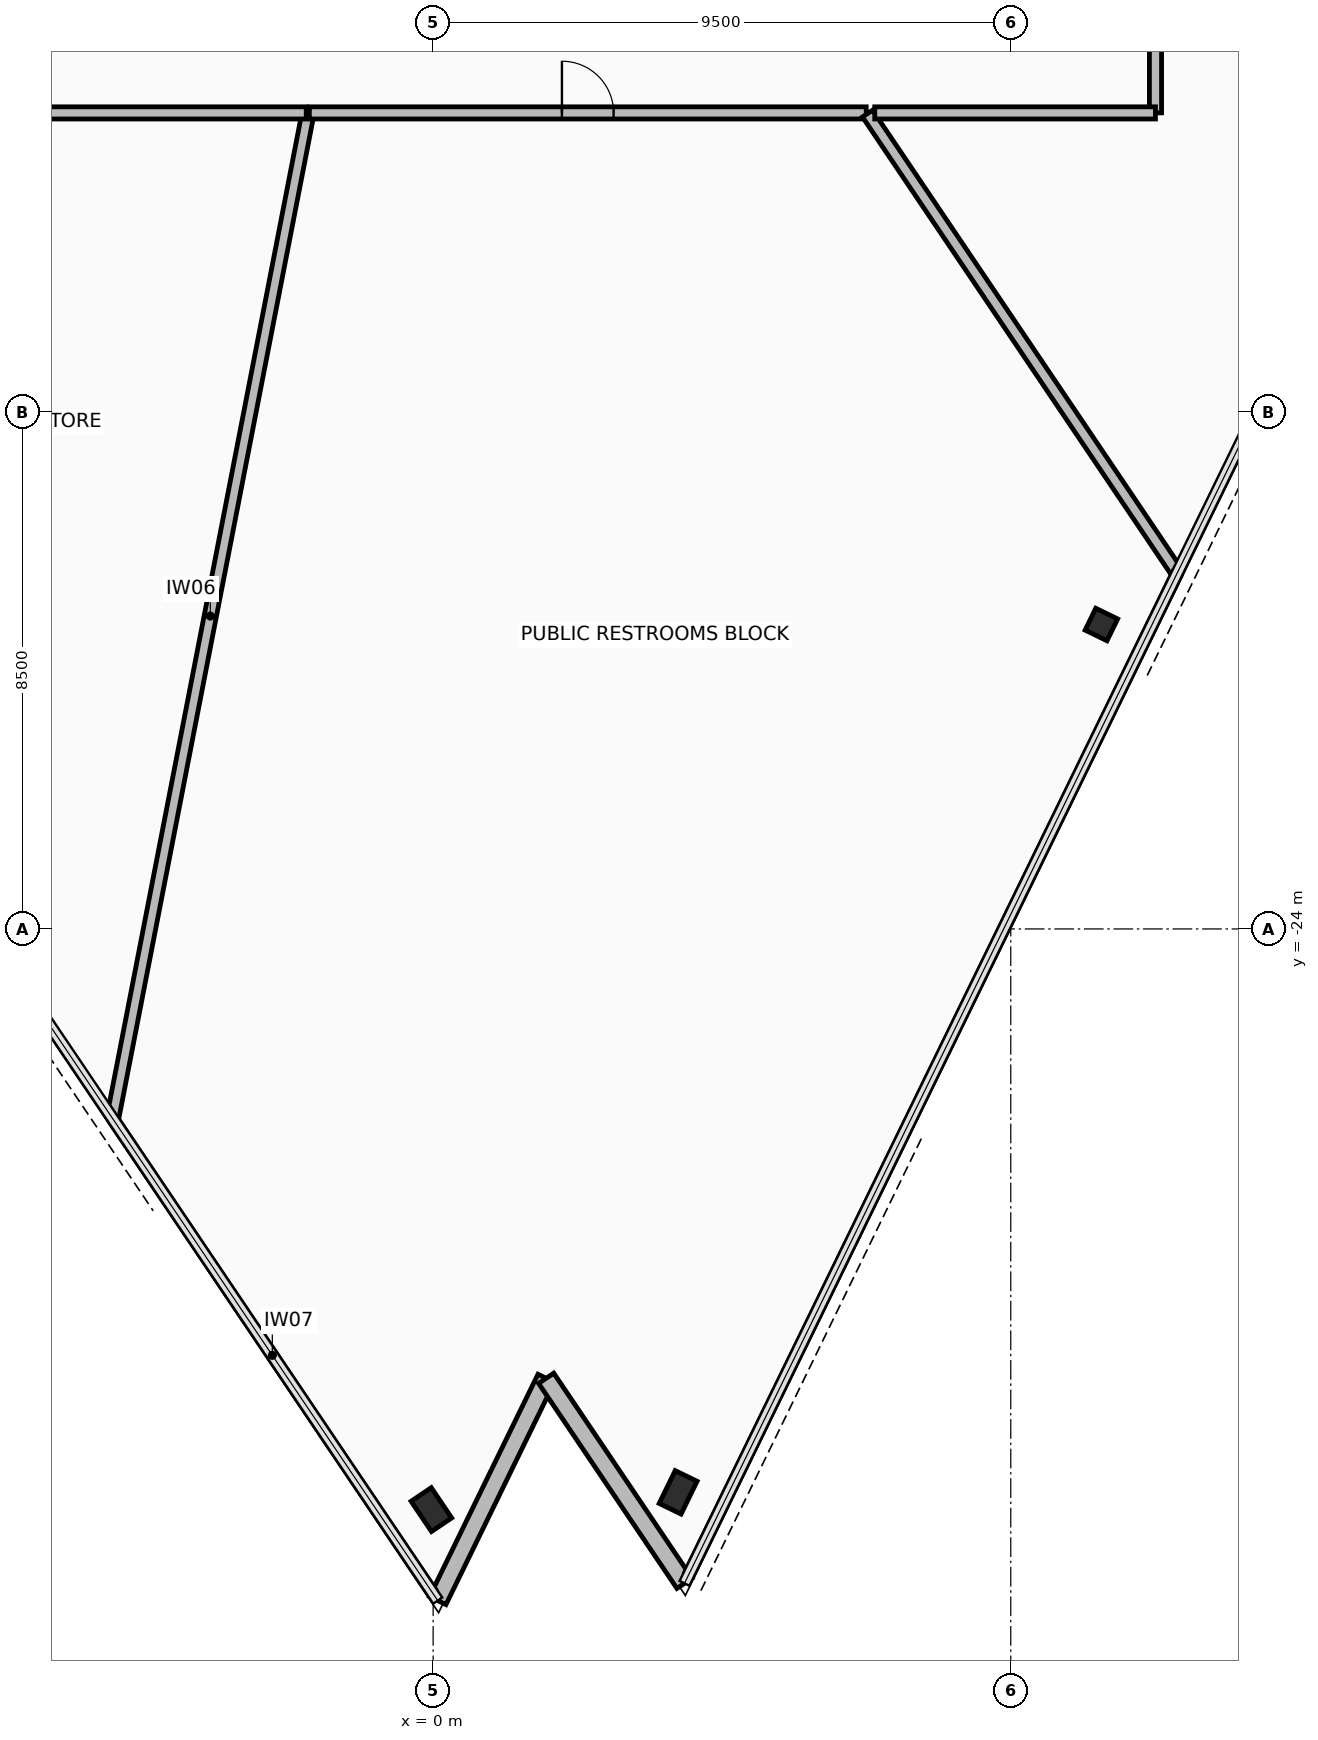
"""IFC4 building model, lengths in metres.
Left out: names, types, materials, properties, quantities, classifications, styles, units other than length and angle.
Written with IfcOpenShell. Run it as: python <this file> out.ifc"""

import sys

from ifc_helpers import new_model, si_unit, direction, frame, frame_2d, origin, origin_2d, place, context, subcontext, project, spatial, rectangle, hollow_rectangle, extrude, element, fill, save


model = new_model("IFC4")
c1 = context("Model", 3, precision=1e-05, world=origin(), true_north=direction((0.0, 1.0)))
c2 = subcontext(c1, "Body", "Model", "MODEL_VIEW")
j1 = project(units=[si_unit("LENGTHUNIT", "METRE"), si_unit("PLANEANGLEUNIT", "RADIAN")], contexts=[c1])
p1 = place(None, origin())
s1 = spatial("IfcSite", under=j1, at=p1, CompositionType="ELEMENT")
p2 = place(p1, origin())
s2 = spatial("IfcBuilding", under=s1, at=p2, CompositionType="ELEMENT")
p3 = place(p2, frame((0.0, 0.0, 264.2)))
s3 = spatial("IfcBuildingStorey", under=s2, at=p3, CompositionType="ELEMENT", Elevation=264.2)
for number, where, z_axis, x_axis in (
    (1, (-0.029, -33.549, 0.0), (0.0, 0.0, 1.0), (-0.559, 0.829, 0.0)),
    (2, (4.029, -33.265, 0.0), (0.0, 0.0, 1.0), (0.438, 0.899, 0.0)),
):
    element("IfcColumn", number, at=place(p3, frame(where, z_axis=z_axis, x_axis=x_axis)), inside=s3, PredefinedType="COLUMN", context=c2, shape_type="SweptSolid", body=[
        extrude(hollow_rectangle(XDim=0.4, YDim=0.6, WallThickness=0.03, at=origin_2d()), origin(), (0.0, 0.0, 1.0), 3.6),
    ])
p4 = place(p3, frame((10.99, -18.994, 0.0), z_axis=(0.0, 0.0, 1.0), x_axis=(0.43837271548, 0.898793281196, 0.0)))
e3 = element("IfcColumn", 3, at=p4, inside=s3, PredefinedType="COLUMN", context=c2, shape_type="SweptSolid", body=[
    extrude(hollow_rectangle(XDim=0.4, YDim=0.4, WallThickness=0.025, at=origin_2d()), origin(), (0.0, 0.0, 1.0), 3.6),
])
p5 = place(p3, frame((0.076, -35.045, 0.0), z_axis=(0.0, 0.0, 1.0), x_axis=(0.438357414153, 0.898800744024, 0.0)))
e4 = element("IfcWall", 4, at=p5, inside=s3, PredefinedType="STANDARD", context=c2, shape_type="SweptSolid", body=[
    extrude(rectangle(XDim=4.068, YDim=0.3, at=frame_2d((2.034, 0.0))), origin(), (0.0, 0.0, 1.0), 2.765),
])
p6 = place(p3, frame((1.859, -31.389, 0.0), z_axis=(0.0, 0.0, 1.0), x_axis=(0.559206900681, -0.829028131145, 0.0)))
e5 = element("IfcWall", 5, at=p6, inside=s3, PredefinedType="STANDARD", context=c2, shape_type="SweptSolid", body=[
    extrude(rectangle(XDim=4.068, YDim=0.3, at=frame_2d((2.034, 0.0))), origin(), (0.0, 0.0, 1.0), 2.765),
])
p7 = place(p3, frame((-0.024, -34.897, 0.0), z_axis=(0.0, 0.0, 1.0), x_axis=(-0.559200376751, 0.829032531715, 0.0)))
e6 = element("IfcWall", 6, at=p7, inside=s3, PredefinedType="PARTITIONING", context=c2, shape_type="SweptSolid", body=[
    extrude(rectangle(XDim=9.373, YDim=0.15, at=frame_2d((4.687, 0.0))), origin(), (0.0, 0.0, 1.0), 3.42),
])
p8 = place(p3, frame((-5.269, -27.108, 0.0), z_axis=(0.0, 0.0, 1.0), x_axis=(0.190805932, 0.981627778903, 0.0)))
e7 = element("IfcWall", 7, at=p8, inside=s3, PredefinedType="PARTITIONING", context=c2, shape_type="SweptSolid", body=[
    extrude(rectangle(XDim=16.817, YDim=0.2, at=frame_2d((8.408, 0.0))), origin(), (0.0, 0.0, 1.0), 2.765),
])
p9 = place(p3, frame((-2.036, -10.58, 0.0), z_axis=(0.0, 0.0, 1.0), x_axis=(1.0, 0.0, 0.0)))
e8 = element("IfcWall", 8, at=p9, inside=s3, PredefinedType="PARTITIONING", context=c2, shape_type="SweptSolid", body=[
    extrude(rectangle(XDim=9.159, YDim=0.2, at=frame_2d((4.58, 0.0))), origin(), (0.0, 0.0, 1.0), 3.42),
])
p10 = place(p9, frame((4.154, 0.0, 0.0)))
e9 = element("IfcOpeningElement", 9, at=p10, cuts=e8, PredefinedType="OPENING", context=c2, shape_type="SweptSolid", body=[
    extrude(rectangle(XDim=0.85, YDim=2.1, at=frame_2d((0.425, 1.05))), frame((0.0, 0.11, 0.0), z_axis=(0.0, -1.0, 0.0), x_axis=(1.0, 0.0, 0.0)), (0.0, 0.0, 1.0), 0.22),
])
p11 = place(p3, frame((7.144, -10.591, 0.0), z_axis=(0.0, 0.0, 1.0), x_axis=(0.559200870539, -0.829032198644, 0.0)))
e10 = element("IfcWall", 10, at=p11, inside=s3, PredefinedType="PARTITIONING", context=c2, shape_type="SweptSolid", body=[
    extrude(rectangle(XDim=9.097, YDim=0.2, at=frame_2d((4.548, 0.0))), origin(), (0.0, 0.0, 1.0), 2.765),
])
p12 = place(p3, frame((12.232, -18.158, 0.0), z_axis=(0.0, 0.0, 1.0), x_axis=(-0.438378934826, -0.898790247778, 0.0)))
e11 = element("IfcWall", 11, at=p12, inside=s3, PredefinedType="PARTITIONING", context=c2, shape_type="SweptSolid", body=[
    extrude(rectangle(XDim=18.295, YDim=0.15, at=frame_2d((9.147, 0.0))), origin(), (0.0, 0.0, 1.0), 3.42),
])
p13 = place(p3, frame((-11.879, -10.58, 0.0), z_axis=(0.0, 0.0, 1.0), x_axis=(1.0, 0.0, 0.0)))
e12 = element("IfcWall", 12, at=p13, inside=s3, PredefinedType="PARTITIONING", context=c2, shape_type="SweptSolid", body=[
    extrude(rectangle(XDim=9.792, YDim=0.2, at=frame_2d((4.896, 0.0))), origin(), (0.0, 0.0, 1.0), 2.915),
])
p14 = place(p13, frame((4.446, 0.0, 0.0)))
e13 = element("IfcOpeningElement", 13, at=p14, cuts=e12, PredefinedType="OPENING", context=c2, shape_type="SweptSolid", body=[
    extrude(rectangle(XDim=0.9, YDim=2.1, at=frame_2d((0.45, 1.05))), frame((0.0, 0.11, 0.0), z_axis=(0.0, -1.0, 0.0), x_axis=(1.0, 0.0, 0.0)), (0.0, 0.0, 1.0), 0.22),
])
p15 = place(p3, frame((11.88, -10.579, 0.0), z_axis=(0.0, 0.0, 1.0), x_axis=(0.0, 1.0, 0.0)))
e14 = element("IfcWall", 14, at=p15, inside=s3, PredefinedType="PARTITIONING", context=c2, shape_type="SweptSolid", body=[
    extrude(rectangle(XDim=8.24, YDim=0.2, at=frame_2d((4.12, 0.0))), origin(), (0.0, 0.0, 1.0), 2.915),
])
p16 = place(p15, frame((3.62, 0.0, 0.0)))
e15 = element("IfcOpeningElement", 15, at=p16, cuts=e14, PredefinedType="OPENING", context=c2, shape_type="SweptSolid", body=[
    extrude(rectangle(XDim=1.0, YDim=2.15, at=frame_2d((0.5, 1.075))), frame((0.0, 0.11, 0.0), z_axis=(0.0, -1.0, 0.0), x_axis=(1.0, 0.0, 0.0)), (0.0, 0.0, 1.0), 0.22),
])
p17 = place(p3, frame((7.263, -10.58, 0.0), z_axis=(0.0, 0.0, 1.0), x_axis=(1.0, 0.0, 0.0)))
e16 = element("IfcWall", 16, at=p17, inside=s3, PredefinedType="PARTITIONING", context=c2, shape_type="SweptSolid", body=[
    extrude(rectangle(XDim=4.616, YDim=0.2, at=frame_2d((2.308, 0.0))), origin(), (0.0, 0.0, 1.0), 2.915),
])
p18 = place(p10, origin())
e17 = element("IfcDoor", 17, at=p18, inside=s3, OperationType="SINGLE_SWING_RIGHT", PredefinedType="DOOR", context=c2, shape_type="SweptSolid", body=[
    extrude(rectangle(XDim=0.85, YDim=2.1, at=frame_2d((0.425, 1.05))), frame((0.0, 0.025, 0.0), z_axis=(0.0, -1.0, 0.0), x_axis=(1.0, 0.0, 0.0)), (0.0, 0.0, 1.0), 0.05),
])
fill(e9, e17)
save(model, sys.argv[1])
